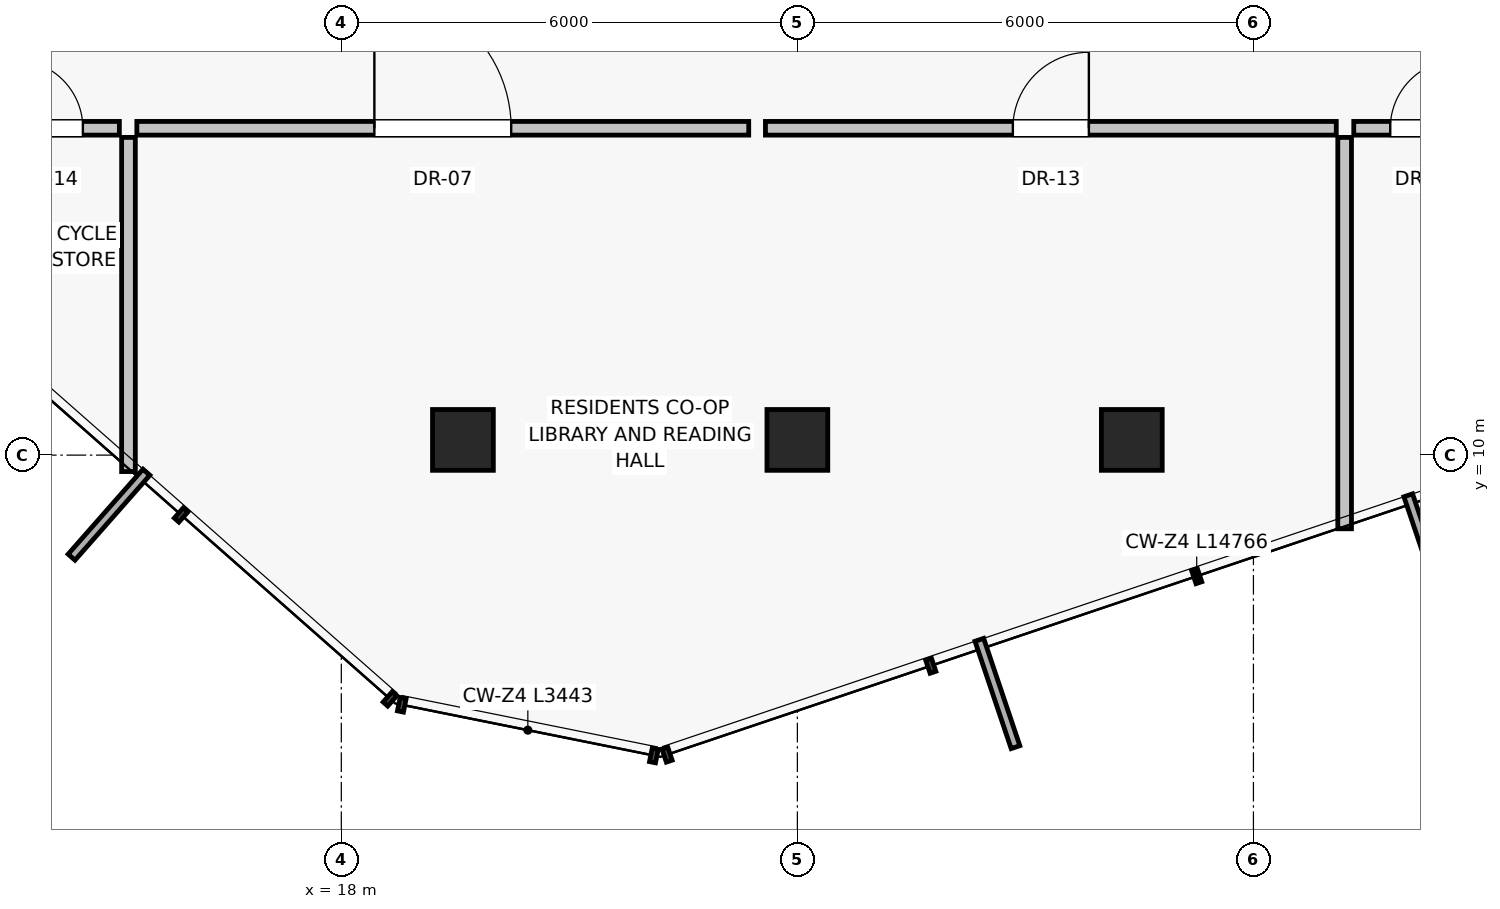
"""IFC4 building model, lengths in metres.
Left out: names, types, materials, properties, quantities, classifications, styles, units other than length and angle.
Written with IfcOpenShell. Run it as: python <this file> out.ifc"""

import sys

from ifc_helpers import new_model, si_unit, direction, frame, frame_2d, origin, origin_2d, place, context, subcontext, project, spatial, rectangle, extrude, source, transform, mapped, element, fill, save


model = new_model("IFC4")
c1 = context("Model", 3, precision=1e-05, world=origin(), true_north=direction((0.0, 1.0)))
c2 = subcontext(c1, "Body", "Model", "MODEL_VIEW")
j1 = project(units=[si_unit("LENGTHUNIT", "METRE"), si_unit("PLANEANGLEUNIT", "RADIAN")], contexts=[c1])
p1 = place(None, origin())
s1 = spatial("IfcSite", under=j1, at=p1, CompositionType="ELEMENT")
p2 = place(p1, origin())
s2 = spatial("IfcBuilding", under=s1, at=p2, CompositionType="ELEMENT")
p3 = place(p2, frame((0.0, 0.0, 248.0)))
s3 = spatial("IfcBuildingStorey", under=s2, at=p3, CompositionType="ELEMENT", Elevation=248.0)
for number, where, z_axis, x_axis in (
    (1, (19.6, 10.2, 0.0), (0.0, 0.0, 1.0), (1.0, 0.0, 0.0)),
    (2, (24.0, 10.2, 0.0), (0.0, 0.0, 1.0), (1.0, 0.0, 0.0)),
    (3, (28.4, 10.2, 0.0), (0.0, 0.0, 1.0), (1.0, 0.0, 0.0)),
):
    element("IfcColumn", number, at=place(p3, frame(where, z_axis=z_axis, x_axis=x_axis)), inside=s3, PredefinedType="COLUMN", context=c2, shape_type="SweptSolid", body=[
        extrude(rectangle(XDim=0.8, YDim=0.8, at=origin_2d()), origin(), (0.0, 0.0, 1.0), 3.25),
    ])
p4 = place(p3, frame((15.2, 14.18, 0.0), z_axis=(0.0, 0.0, 1.0), x_axis=(0.0, -1.0, 0.0)))
e4 = element("IfcWall", 4, at=p4, inside=s3, PredefinedType="PARTITIONING", context=c2, shape_type="SweptSolid", body=[
    extrude(rectangle(XDim=4.396, YDim=0.18, at=frame_2d((2.198, 0.0))), origin(), (0.0, 0.0, 1.0), 3.015),
])
p5 = place(p3, frame((31.2, 14.18, 0.0), z_axis=(0.0, 0.0, 1.0), x_axis=(0.0, -1.0, 0.0)))
e5 = element("IfcWall", 5, at=p5, inside=s3, PredefinedType="PARTITIONING", context=c2, shape_type="SweptSolid", body=[
    extrude(rectangle(XDim=5.149, YDim=0.18, at=frame_2d((2.574, 0.0))), origin(), (0.0, 0.0, 1.0), 3.015),
])
p6 = place(p3, frame((15.31, 14.3, 0.0), z_axis=(0.0, 0.0, 1.0), x_axis=(1.0, 0.0, 0.0)))
e6 = element("IfcWall", 6, at=p6, inside=s3, PredefinedType="PARTITIONING", context=c2, shape_type="SweptSolid", body=[
    extrude(rectangle(XDim=8.05, YDim=0.18, at=frame_2d((4.025, 0.0))), origin(), (0.0, 0.0, 1.0), 3.015),
])
p7 = place(p6, frame((3.125, 0.0, 0.0)))
e7 = element("IfcOpeningElement", 7, at=p7, cuts=e6, PredefinedType="OPENING", context=c2, shape_type="SweptSolid", body=[
    extrude(rectangle(XDim=1.8, YDim=2.25, at=frame_2d((0.9, 1.125))), frame((0.0, 0.1, 0.0), z_axis=(0.0, -1.0, 0.0), x_axis=(1.0, 0.0, 0.0)), (0.0, 0.0, 1.0), 0.2),
])
p8 = place(p3, frame((23.58, 14.3, 0.0), z_axis=(0.0, 0.0, 1.0), x_axis=(1.0, 0.0, 0.0)))
e8 = element("IfcWall", 8, at=p8, inside=s3, PredefinedType="PARTITIONING", context=c2, shape_type="SweptSolid", body=[
    extrude(rectangle(XDim=7.51, YDim=0.18, at=frame_2d((3.755, 0.0))), origin(), (0.0, 0.0, 1.0), 3.015),
])
p9 = place(p8, frame((3.255, 0.0, 0.0)))
e9 = element("IfcOpeningElement", 9, at=p9, cuts=e8, PredefinedType="OPENING", context=c2, shape_type="SweptSolid", body=[
    extrude(rectangle(XDim=1.0, YDim=2.01, at=frame_2d((0.5, 1.005))), frame((0.0, 0.1, 0.0), z_axis=(0.0, -1.0, 0.0), x_axis=(1.0, 0.0, 0.0)), (0.0, 0.0, 1.0), 0.2),
])
p10 = place(p3, frame((13.22, 14.3, 0.0), z_axis=(0.0, 0.0, 1.0), x_axis=(1.0, 0.0, 0.0)))
e10 = element("IfcWall", 10, at=p10, inside=s3, PredefinedType="PARTITIONING", context=c2, shape_type="SweptSolid", body=[
    extrude(rectangle(XDim=1.86, YDim=0.18, at=frame_2d((0.93, 0.0))), origin(), (0.0, 0.0, 1.0), 3.015),
])
p11 = place(p10, frame((0.48, 0.0, 0.0)))
e11 = element("IfcOpeningElement", 11, at=p11, cuts=e10, PredefinedType="OPENING", context=c2, shape_type="SweptSolid", body=[
    extrude(rectangle(XDim=0.9, YDim=2.01, at=frame_2d((0.45, 1.005))), frame((0.0, 0.1, 0.0), z_axis=(0.0, -1.0, 0.0), x_axis=(1.0, 0.0, 0.0)), (0.0, 0.0, 1.0), 0.2),
])
p12 = place(p3, frame((31.32, 14.3, 0.0), z_axis=(0.0, 0.0, 1.0), x_axis=(1.0, 0.0, 0.0)))
e12 = element("IfcWall", 12, at=p12, inside=s3, PredefinedType="PARTITIONING", context=c2, shape_type="SweptSolid", body=[
    extrude(rectangle(XDim=1.86, YDim=0.18, at=frame_2d((0.93, 0.0))), origin(), (0.0, 0.0, 1.0), 3.015),
])
p13 = place(p12, frame((0.48, 0.0, 0.0)))
e13 = element("IfcOpeningElement", 13, at=p13, cuts=e12, PredefinedType="OPENING", context=c2, shape_type="SweptSolid", body=[
    extrude(rectangle(XDim=0.9, YDim=2.01, at=frame_2d((0.45, 1.005))), frame((0.0, 0.1, 0.0), z_axis=(0.0, -1.0, 0.0), x_axis=(1.0, 0.0, 0.0)), (0.0, 0.0, 1.0), 0.2),
])
m1 = source(origin(), c2, "Body", "SweptSolid", [
    extrude(rectangle(XDim=1.8, YDim=2.25, at=frame_2d((0.9, 1.125))), frame((0.0, 0.025, 0.0), z_axis=(0.0, -1.0, 0.0), x_axis=(1.0, 0.0, 0.0)), (0.0, 0.0, 1.0), 0.05),
])
p14 = place(p7, origin())
e14 = element("IfcDoor", 14, at=p14, inside=s3, OperationType="SINGLE_SWING_LEFT", PredefinedType="DOOR", context=c2, shape_type="MappedRepresentation", body=[
    mapped(m1, transform((0.0, 0.0, 0.0), scale=1.0)),
])
fill(e7, e14)
m2 = source(origin(), c2, "Body", "SweptSolid", [
    extrude(rectangle(XDim=1.0, YDim=2.01, at=frame_2d((0.5, 1.005))), frame((0.0, 0.025, 0.0), z_axis=(0.0, -1.0, 0.0), x_axis=(1.0, 0.0, 0.0)), (0.0, 0.0, 1.0), 0.05),
])
p15 = place(p9, origin())
e15 = element("IfcDoor", 15, at=p15, inside=s3, OperationType="SINGLE_SWING_RIGHT", PredefinedType="DOOR", context=c2, shape_type="MappedRepresentation", body=[
    mapped(m2, transform((0.0, 0.0, 0.0), scale=1.0)),
])
fill(e9, e15)
m3 = source(origin(), c2, "Body", "SweptSolid", [
    extrude(rectangle(XDim=0.9, YDim=2.01, at=frame_2d((0.45, 1.005))), frame((0.0, 0.025, 0.0), z_axis=(0.0, -1.0, 0.0), x_axis=(1.0, 0.0, 0.0)), (0.0, 0.0, 1.0), 0.05),
])
p16 = place(p11, origin())
e16 = element("IfcDoor", 16, at=p16, inside=s3, OperationType="SINGLE_SWING_LEFT", PredefinedType="DOOR", context=c2, shape_type="MappedRepresentation", body=[
    mapped(m3, transform((0.0, 0.0, 0.0), scale=1.0)),
])
fill(e11, e16)
p17 = place(p13, origin())
e17 = element("IfcDoor", 17, at=p17, inside=s3, OperationType="SINGLE_SWING_RIGHT", PredefinedType="DOOR", context=c2, shape_type="MappedRepresentation", body=[
    mapped(m3, transform((0.0, 0.0, 0.0), scale=1.0)),
])
fill(e13, e17)
save(model, sys.argv[1])
